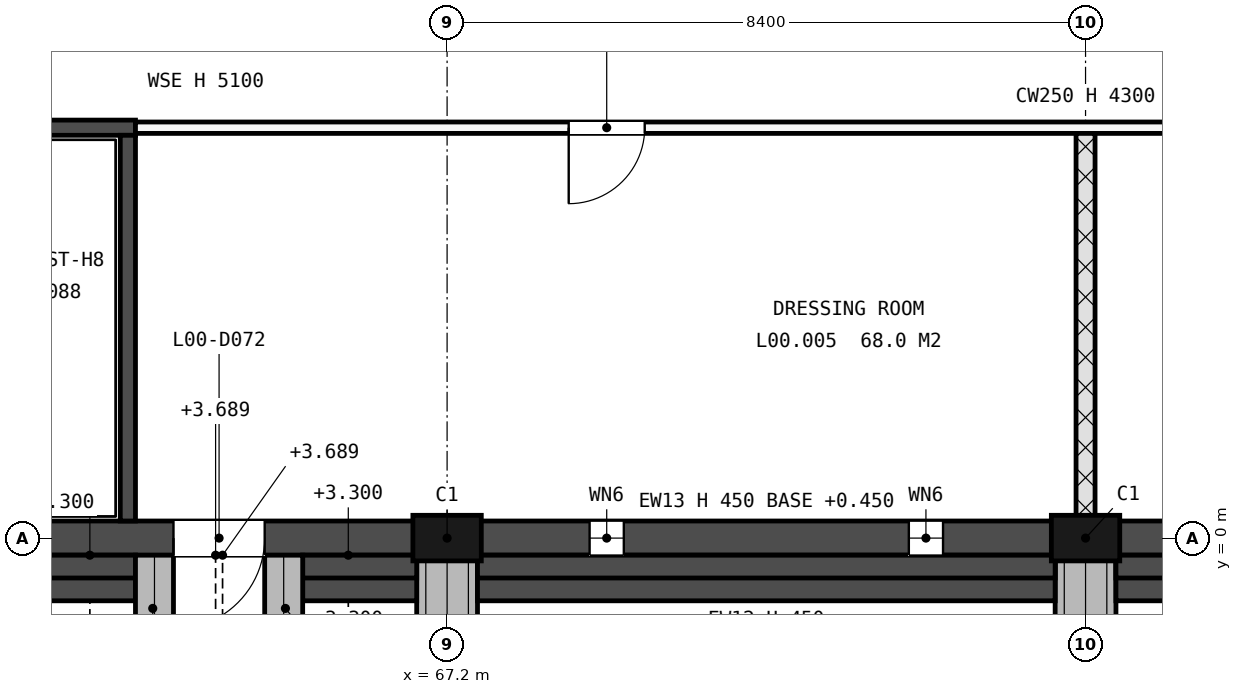
"""IFC4 building model, lengths in metres.
Left out: names, types, materials, properties, quantities, classifications, styles, units other than length and angle.
Written with IfcOpenShell. Run it as: python <this file> out.ifc"""

import sys

from ifc_helpers import new_model, si_unit, direction, frame, frame_2d, origin, origin_2d, place, context, subcontext, project, spatial, rectangle, extrude, element, fill, save


model = new_model("IFC4")
c1 = context("Model", 3, precision=1e-05, world=origin(), true_north=direction((0.0, 1.0)))
c2 = subcontext(c1, "Body", "Model", "MODEL_VIEW")
j1 = project(units=[si_unit("LENGTHUNIT", "METRE"), si_unit("PLANEANGLEUNIT", "RADIAN")], contexts=[c1])
p1 = place(None, origin())
s1 = spatial("IfcSite", under=j1, at=p1, CompositionType="ELEMENT")
p2 = place(p1, origin())
s2 = spatial("IfcBuilding", under=s1, at=p2, CompositionType="ELEMENT")
p3 = place(p2, origin())
s3 = spatial("IfcBuildingStorey", under=s2, at=p3, CompositionType="ELEMENT", Elevation=0.0)
for number, where, z_axis, x_axis in (
    (1, (67.2, 0.0, -0.3), (0.0, 0.0, 1.0), (1.0, 0.0, 0.0)),
    (2, (75.6, 0.0, -0.3), (0.0, 0.0, 1.0), (1.0, 0.0, 0.0)),
):
    element("IfcColumn", number, at=place(p3, frame(where, z_axis=z_axis, x_axis=x_axis)), inside=s3, PredefinedType="PILASTER", context=c2, shape_type="SweptSolid", body=[
        extrude(rectangle(XDim=0.9, YDim=0.6, at=origin_2d()), origin(), (0.0, 0.0, 1.0), 5.4),
    ])
p4 = place(p3, frame((0.0, 0.0, -0.3), z_axis=(0.0, 0.0, 1.0), x_axis=(1.0, 0.0, 0.0)))
e3 = element("IfcWall", 3, at=p4, inside=s3, PredefinedType="SOLIDWALL", context=c2, shape_type="SweptSolid", body=[
    extrude(rectangle(XDim=168.0, YDim=0.45, at=frame_2d((84.0, 0.0))), origin(), (0.0, 0.0, 1.0), 5.4),
])
p5 = place(p4, frame((34.8, 0.0, 2.7)))
e4 = element("IfcOpeningElement", 4, at=p5, cuts=e3, PredefinedType="OPENING", context=c2, shape_type="SweptSolid", body=[
    extrude(rectangle(XDim=1.8, YDim=1.2, at=frame_2d((0.9, 0.6))), frame((0.0, 0.235, 0.0), z_axis=(0.0, -1.0, 0.0), x_axis=(1.0, 0.0, 0.0)), (0.0, 0.0, 1.0), 0.47),
])
p6 = place(p4, frame((69.075, 0.0, 1.5)))
e5 = element("IfcOpeningElement", 5, at=p6, cuts=e3, PredefinedType="OPENING", context=c2, shape_type="SweptSolid", body=[
    extrude(rectangle(XDim=0.45, YDim=2.4, at=frame_2d((0.225, 1.2))), frame((0.0, 0.235, 0.0), z_axis=(0.0, -1.0, 0.0), x_axis=(1.0, 0.0, 0.0)), (0.0, 0.0, 1.0), 0.47),
])
p7 = place(p4, frame((73.275, 0.0, 1.5)))
e6 = element("IfcOpeningElement", 6, at=p7, cuts=e3, PredefinedType="OPENING", context=c2, shape_type="SweptSolid", body=[
    extrude(rectangle(XDim=0.45, YDim=2.4, at=frame_2d((0.225, 1.2))), frame((0.0, 0.235, 0.0), z_axis=(0.0, -1.0, 0.0), x_axis=(1.0, 0.0, 0.0)), (0.0, 0.0, 1.0), 0.47),
])
p8 = place(p4, frame((135.0, 0.0, 2.7)))
e7 = element("IfcOpeningElement", 7, at=p8, cuts=e3, PredefinedType="OPENING", context=c2, shape_type="SweptSolid", body=[
    extrude(rectangle(XDim=1.8, YDim=1.2, at=frame_2d((0.9, 0.6))), frame((0.0, 0.235, 0.0), z_axis=(0.0, -1.0, 0.0), x_axis=(1.0, 0.0, 0.0)), (0.0, 0.0, 1.0), 0.47),
])
p9 = place(p4, frame((144.0, 0.0, 2.7)))
e8 = element("IfcOpeningElement", 8, at=p9, cuts=e3, PredefinedType="OPENING", context=c2, shape_type="SweptSolid", body=[
    extrude(rectangle(XDim=1.8, YDim=1.2, at=frame_2d((0.9, 0.6))), frame((0.0, 0.235, 0.0), z_axis=(0.0, -1.0, 0.0), x_axis=(1.0, 0.0, 0.0)), (0.0, 0.0, 1.0), 0.47),
])
p10 = place(p4, frame((114.6, 0.0, 0.3), z_axis=(0.0, 0.0, 1.0), x_axis=(-1.0, 0.0, 0.0)))
e9 = element("IfcOpeningElement", 9, at=p10, cuts=e3, PredefinedType="OPENING", context=c2, shape_type="SweptSolid", body=[
    extrude(rectangle(XDim=2.1, YDim=2.2, at=frame_2d((1.05, 1.1))), frame((0.0, 0.235, 0.0), z_axis=(0.0, -1.0, 0.0), x_axis=(1.0, 0.0, 0.0)), (0.0, 0.0, 1.0), 0.47),
])
p11 = place(p4, frame((117.3, 0.0, 0.3), z_axis=(0.0, 0.0, 1.0), x_axis=(-1.0, 0.0, 0.0)))
e10 = element("IfcOpeningElement", 10, at=p11, cuts=e3, PredefinedType="OPENING", context=c2, shape_type="SweptSolid", body=[
    extrude(rectangle(XDim=2.1, YDim=2.2, at=frame_2d((1.05, 1.1))), frame((0.0, 0.235, 0.0), z_axis=(0.0, -1.0, 0.0), x_axis=(1.0, 0.0, 0.0)), (0.0, 0.0, 1.0), 0.47),
])
p12 = place(p4, frame((106.05, 0.0, 0.3), z_axis=(0.0, 0.0, 1.0), x_axis=(-1.0, 0.0, 0.0)))
e11 = element("IfcOpeningElement", 11, at=p12, cuts=e3, PredefinedType="OPENING", context=c2, shape_type="SweptSolid", body=[
    extrude(rectangle(XDim=2.1, YDim=2.2, at=frame_2d((1.05, 1.1))), frame((0.0, 0.235, 0.0), z_axis=(0.0, -1.0, 0.0), x_axis=(1.0, 0.0, 0.0)), (0.0, 0.0, 1.0), 0.47),
])
p13 = place(p4, frame((57.25, 0.0, 0.3), z_axis=(0.0, 0.0, 1.0), x_axis=(-1.0, 0.0, 0.0)))
e12 = element("IfcOpeningElement", 12, at=p13, cuts=e3, PredefinedType="OPENING", context=c2, shape_type="SweptSolid", body=[
    extrude(rectangle(XDim=2.1, YDim=2.2, at=frame_2d((1.05, 1.1))), frame((0.0, 0.235, 0.0), z_axis=(0.0, -1.0, 0.0), x_axis=(1.0, 0.0, 0.0)), (0.0, 0.0, 1.0), 0.47),
])
p14 = place(p4, frame((120.75, 0.0, 0.3), z_axis=(0.0, 0.0, 1.0), x_axis=(-1.0, 0.0, 0.0)))
e13 = element("IfcOpeningElement", 13, at=p14, cuts=e3, PredefinedType="OPENING", context=c2, shape_type="SweptSolid", body=[
    extrude(rectangle(XDim=2.1, YDim=2.2, at=frame_2d((1.05, 1.1))), frame((0.0, 0.235, 0.0), z_axis=(0.0, -1.0, 0.0), x_axis=(1.0, 0.0, 0.0)), (0.0, 0.0, 1.0), 0.47),
])
p15 = place(p4, frame((124.95, 0.0, 0.3), z_axis=(0.0, 0.0, 1.0), x_axis=(-1.0, 0.0, 0.0)))
e14 = element("IfcOpeningElement", 14, at=p15, cuts=e3, PredefinedType="OPENING", context=c2, shape_type="SweptSolid", body=[
    extrude(rectangle(XDim=2.1, YDim=2.2, at=frame_2d((1.05, 1.1))), frame((0.0, 0.235, 0.0), z_axis=(0.0, -1.0, 0.0), x_axis=(1.0, 0.0, 0.0)), (0.0, 0.0, 1.0), 0.47),
])
p16 = place(p4, frame((19.45, 0.0, 0.3), z_axis=(0.0, 0.0, 1.0), x_axis=(-1.0, 0.0, 0.0)))
e15 = element("IfcOpeningElement", 15, at=p16, cuts=e3, PredefinedType="OPENING", context=c2, shape_type="SweptSolid", body=[
    extrude(rectangle(XDim=2.1, YDim=2.2, at=frame_2d((1.05, 1.1))), frame((0.0, 0.235, 0.0), z_axis=(0.0, -1.0, 0.0), x_axis=(1.0, 0.0, 0.0)), (0.0, 0.0, 1.0), 0.47),
])
p17 = place(p4, frame((162.25, 0.0, 0.3), z_axis=(0.0, 0.0, 1.0), x_axis=(-1.0, 0.0, 0.0)))
e16 = element("IfcOpeningElement", 16, at=p17, cuts=e3, PredefinedType="OPENING", context=c2, shape_type="SweptSolid", body=[
    extrude(rectangle(XDim=2.1, YDim=2.2, at=frame_2d((1.05, 1.1))), frame((0.0, 0.235, 0.0), z_axis=(0.0, -1.0, 0.0), x_axis=(1.0, 0.0, 0.0)), (0.0, 0.0, 1.0), 0.47),
])
p18 = place(p4, frame((4.8, 0.0, 0.3), z_axis=(0.0, 0.0, 1.0), x_axis=(-1.0, 0.0, 0.0)))
e17 = element("IfcOpeningElement", 17, at=p18, cuts=e3, PredefinedType="OPENING", context=c2, shape_type="SweptSolid", body=[
    extrude(rectangle(XDim=1.2, YDim=2.2, at=frame_2d((0.6, 1.1))), frame((0.0, 0.235, 0.0), z_axis=(0.0, -1.0, 0.0), x_axis=(1.0, 0.0, 0.0)), (0.0, 0.0, 1.0), 0.47),
])
p19 = place(p4, frame((64.8, 0.0, 0.3), z_axis=(0.0, 0.0, 1.0), x_axis=(-1.0, 0.0, 0.0)))
e18 = element("IfcOpeningElement", 18, at=p19, cuts=e3, PredefinedType="OPENING", context=c2, shape_type="SweptSolid", body=[
    extrude(rectangle(XDim=1.2, YDim=2.2, at=frame_2d((0.6, 1.1))), frame((0.0, 0.235, 0.0), z_axis=(0.0, -1.0, 0.0), x_axis=(1.0, 0.0, 0.0)), (0.0, 0.0, 1.0), 0.47),
])
p20 = place(p4, frame((81.0, 0.0, 0.3), z_axis=(0.0, 0.0, 1.0), x_axis=(-1.0, 0.0, 0.0)))
e19 = element("IfcOpeningElement", 19, at=p20, cuts=e3, PredefinedType="OPENING", context=c2, shape_type="SweptSolid", body=[
    extrude(rectangle(XDim=2.4, YDim=2.4, at=frame_2d((1.2, 1.2))), frame((0.0, 0.235, 0.0), z_axis=(0.0, -1.0, 0.0), x_axis=(1.0, 0.0, 0.0)), (0.0, 0.0, 1.0), 0.47),
])
p21 = place(p4, frame((97.8, 0.0, 0.3), z_axis=(0.0, 0.0, 1.0), x_axis=(-1.0, 0.0, 0.0)))
e20 = element("IfcOpeningElement", 20, at=p21, cuts=e3, PredefinedType="OPENING", context=c2, shape_type="SweptSolid", body=[
    extrude(rectangle(XDim=2.4, YDim=2.4, at=frame_2d((1.2, 1.2))), frame((0.0, 0.235, 0.0), z_axis=(0.0, -1.0, 0.0), x_axis=(1.0, 0.0, 0.0)), (0.0, 0.0, 1.0), 0.47),
])
p22 = place(p4, frame((139.8, 0.0, 0.3), z_axis=(0.0, 0.0, 1.0), x_axis=(-1.0, 0.0, 0.0)))
e21 = element("IfcOpeningElement", 21, at=p22, cuts=e3, PredefinedType="OPENING", context=c2, shape_type="SweptSolid", body=[
    extrude(rectangle(XDim=2.4, YDim=2.1, at=frame_2d((1.2, 1.05))), frame((0.0, 0.235, 0.0), z_axis=(0.0, -1.0, 0.0), x_axis=(1.0, 0.0, 0.0)), (0.0, 0.0, 1.0), 0.47),
])
p23 = place(p4, frame((156.3, 0.0, 0.3), z_axis=(0.0, 0.0, 1.0), x_axis=(-1.0, 0.0, 0.0)))
e22 = element("IfcOpeningElement", 22, at=p23, cuts=e3, PredefinedType="OPENING", context=c2, shape_type="SweptSolid", body=[
    extrude(rectangle(XDim=1.8, YDim=2.2, at=frame_2d((0.9, 1.1))), frame((0.0, 0.235, 0.0), z_axis=(0.0, -1.0, 0.0), x_axis=(1.0, 0.0, 0.0)), (0.0, 0.0, 1.0), 0.47),
])
for number, where, z_axis, x_axis in (
    (23, (67.2, -0.225, 0.0), (0.0, 0.0, 1.0), (0.0, -1.0, 0.0)),
    (24, (75.6, -0.225, 0.0), (0.0, 0.0, 1.0), (0.0, -1.0, 0.0)),
):
    element("IfcWall", number, at=place(p3, frame(where, z_axis=z_axis, x_axis=x_axis)), inside=s3, PredefinedType="SOLIDWALL", context=c2, shape_type="SweptSolid", body=[
        extrude(rectangle(XDim=0.9, YDim=0.8, at=frame_2d((0.45, 0.0))), origin(), (0.0, 0.0, 1.0), 5.1),
    ])
p24 = place(p3, frame((59.2, -0.525, 0.0), z_axis=(0.0, 0.0, 1.0), x_axis=(1.0, 0.0, 0.0)))
e25 = element("IfcWall", 25, at=p24, inside=s3, PredefinedType="SOLIDWALL", context=c2, shape_type="SweptSolid", body=[
    extrude(rectangle(XDim=3.9, YDim=0.6, at=frame_2d((1.95, 0.0))), origin(), (0.0, 0.0, 1.0), 0.45),
])
p25 = place(p3, frame((59.2, -0.375, 0.45), z_axis=(0.0, 0.0, 1.0), x_axis=(1.0, 0.0, 0.0)))
e26 = element("IfcWall", 26, at=p25, inside=s3, PredefinedType="SOLIDWALL", context=c2, shape_type="SweptSolid", body=[
    extrude(rectangle(XDim=3.9, YDim=0.3, at=frame_2d((1.95, 0.0))), origin(), (0.0, 0.0, 1.0), 0.45),
])
p26 = place(p3, frame((65.3, -0.525, 0.0), z_axis=(0.0, 0.0, 1.0), x_axis=(1.0, 0.0, 0.0)))
e27 = element("IfcWall", 27, at=p26, inside=s3, PredefinedType="SOLIDWALL", context=c2, shape_type="SweptSolid", body=[
    extrude(rectangle(XDim=1.5, YDim=0.6, at=frame_2d((0.75, 0.0))), origin(), (0.0, 0.0, 1.0), 0.45),
])
p27 = place(p3, frame((65.3, -0.375, 0.45), z_axis=(0.0, 0.0, 1.0), x_axis=(1.0, 0.0, 0.0)))
e28 = element("IfcWall", 28, at=p27, inside=s3, PredefinedType="SOLIDWALL", context=c2, shape_type="SweptSolid", body=[
    extrude(rectangle(XDim=1.5, YDim=0.3, at=frame_2d((0.75, 0.0))), origin(), (0.0, 0.0, 1.0), 0.45),
])
p28 = place(p3, frame((67.6, -0.525, 0.0), z_axis=(0.0, 0.0, 1.0), x_axis=(1.0, 0.0, 0.0)))
e29 = element("IfcWall", 29, at=p28, inside=s3, PredefinedType="SOLIDWALL", context=c2, shape_type="SweptSolid", body=[
    extrude(rectangle(XDim=7.6, YDim=0.6, at=frame_2d((3.8, 0.0))), origin(), (0.0, 0.0, 1.0), 0.45),
])
p29 = place(p3, frame((67.6, -0.375, 0.45), z_axis=(0.0, 0.0, 1.0), x_axis=(1.0, 0.0, 0.0)))
e30 = element("IfcWall", 30, at=p29, inside=s3, PredefinedType="SOLIDWALL", context=c2, shape_type="SweptSolid", body=[
    extrude(rectangle(XDim=7.6, YDim=0.3, at=frame_2d((3.8, 0.0))), origin(), (0.0, 0.0, 1.0), 0.45),
])
p30 = place(p3, frame((76.0, -0.525, 0.0), z_axis=(0.0, 0.0, 1.0), x_axis=(1.0, 0.0, 0.0)))
e31 = element("IfcWall", 31, at=p30, inside=s3, PredefinedType="SOLIDWALL", context=c2, shape_type="SweptSolid", body=[
    extrude(rectangle(XDim=2.1, YDim=0.6, at=frame_2d((1.05, 0.0))), origin(), (0.0, 0.0, 1.0), 0.45),
])
p31 = place(p3, frame((76.0, -0.375, 0.45), z_axis=(0.0, 0.0, 1.0), x_axis=(1.0, 0.0, 0.0)))
e32 = element("IfcWall", 32, at=p31, inside=s3, PredefinedType="SOLIDWALL", context=c2, shape_type="SweptSolid", body=[
    extrude(rectangle(XDim=2.1, YDim=0.3, at=frame_2d((1.05, 0.0))), origin(), (0.0, 0.0, 1.0), 0.45),
])
for number, where, z_axis, x_axis in (
    (33, (63.35, -0.225, 0.0), (0.0, 0.0, 1.0), (0.0, -1.0, 0.0)),
    (34, (65.05, -0.225, 0.0), (0.0, 0.0, 1.0), (0.0, -1.0, 0.0)),
):
    element("IfcWall", number, at=place(p3, frame(where, z_axis=z_axis, x_axis=x_axis)), inside=s3, PredefinedType="SOLIDWALL", context=c2, shape_type="SweptSolid", body=[
        extrude(rectangle(XDim=1.4, YDim=0.5, at=frame_2d((0.7, 0.0))), origin(), (0.0, 0.0, 1.0), 3.08),
    ])
p32 = place(p3, frame((54.5, 5.4, 0.0), z_axis=(0.0, 0.0, 1.0), x_axis=(1.0, 0.0, 0.0)))
e35 = element("IfcWall", 35, at=p32, inside=s3, PredefinedType="SHEAR", context=c2, shape_type="SweptSolid", body=[
    extrude(rectangle(XDim=8.6, YDim=0.2, at=frame_2d((4.3, 0.0))), origin(), (0.0, 0.0, 1.0), 5.1),
])
p33 = place(p32, frame((0.35, 0.0, 0.0)))
e36 = element("IfcOpeningElement", 36, at=p33, cuts=e35, PredefinedType="OPENING", context=c2, shape_type="SweptSolid", body=[
    extrude(rectangle(XDim=1.0, YDim=2.1, at=frame_2d((0.5, 1.05))), frame((0.0, 0.11, 0.0), z_axis=(0.0, -1.0, 0.0), x_axis=(1.0, 0.0, 0.0)), (0.0, 0.0, 1.0), 0.22),
])
p34 = place(p3, frame((63.0, 0.225, 0.0), z_axis=(0.0, 0.0, 1.0), x_axis=(0.0, 1.0, 0.0)))
e37 = element("IfcWall", 37, at=p34, inside=s3, PredefinedType="SHEAR", context=c2, shape_type="SweptSolid", body=[
    extrude(rectangle(XDim=5.075, YDim=0.2, at=frame_2d((2.538, 0.0))), origin(), (0.0, 0.0, 1.0), 5.1),
])
p35 = place(p3, frame((63.1, 5.4, 0.0), z_axis=(0.0, 0.0, 1.0), x_axis=(1.0, 0.0, 0.0)))
e38 = element("IfcWall", 38, at=p35, inside=s3, PredefinedType="PARTITIONING", context=c2, shape_type="SweptSolid", body=[
    extrude(rectangle(XDim=29.425, YDim=0.15, at=frame_2d((14.712, 0.0))), origin(), (0.0, 0.0, 1.0), 5.1),
])
p36 = place(p35, frame((5.7, 0.0, 0.0)))
e39 = element("IfcOpeningElement", 39, at=p36, cuts=e38, PredefinedType="OPENING", context=c2, shape_type="SweptSolid", body=[
    extrude(rectangle(XDim=1.0, YDim=2.1, at=frame_2d((0.5, 1.05))), frame((0.0, 0.085, 0.0), z_axis=(0.0, -1.0, 0.0), x_axis=(1.0, 0.0, 0.0)), (0.0, 0.0, 1.0), 0.17),
])
p37 = place(p35, frame((20.4, 0.0, 0.0)))
e40 = element("IfcOpeningElement", 40, at=p37, cuts=e38, PredefinedType="OPENING", context=c2, shape_type="SweptSolid", body=[
    extrude(rectangle(XDim=1.0, YDim=2.1, at=frame_2d((0.5, 1.05))), frame((0.0, 0.085, 0.0), z_axis=(0.0, -1.0, 0.0), x_axis=(1.0, 0.0, 0.0)), (0.0, 0.0, 1.0), 0.17),
])
p38 = place(p3, frame((75.6, 0.225, 0.0), z_axis=(0.0, 0.0, 1.0), x_axis=(0.0, 1.0, 0.0)))
e41 = element("IfcWall", 41, at=p38, inside=s3, PredefinedType="SOLIDWALL", context=c2, shape_type="SweptSolid", body=[
    extrude(rectangle(XDim=5.1, YDim=0.25, at=frame_2d((2.55, 0.0))), origin(), (0.0, 0.0, 1.0), 4.3),
])
p39 = place(p6, origin())
e42 = element("IfcWindow", 42, at=p39, inside=s3, PartitioningType="SINGLE_PANEL", PredefinedType="WINDOW", context=c2, shape_type="SweptSolid", body=[
    extrude(rectangle(XDim=0.45, YDim=2.4, at=frame_2d((0.225, 1.2))), frame((0.0, 0.03, 0.0), z_axis=(0.0, -1.0, 0.0), x_axis=(1.0, 0.0, 0.0)), (0.0, 0.0, 1.0), 0.06),
])
fill(e5, e42)
p40 = place(p7, origin())
e43 = element("IfcWindow", 43, at=p40, inside=s3, PartitioningType="SINGLE_PANEL", PredefinedType="WINDOW", context=c2, shape_type="SweptSolid", body=[
    extrude(rectangle(XDim=0.45, YDim=2.4, at=frame_2d((0.225, 1.2))), frame((0.0, 0.03, 0.0), z_axis=(0.0, -1.0, 0.0), x_axis=(1.0, 0.0, 0.0)), (0.0, 0.0, 1.0), 0.06),
])
fill(e6, e43)
p41 = place(p19, origin())
e44 = element("IfcDoor", 44, at=p41, inside=s3, OperationType="SINGLE_SWING_LEFT", PredefinedType="DOOR", context=c2, shape_type="SweptSolid", body=[
    extrude(rectangle(XDim=1.2, YDim=0.013, at=frame_2d((0.6, 0.007))), frame((0.0, 0.115, 0.0), z_axis=(0.0, -1.0, 0.0), x_axis=(1.0, 0.0, 0.0)), (0.0, 0.0, 1.0), 0.23),
    extrude(rectangle(XDim=0.06, YDim=2.127, at=frame_2d((0.03, 1.076))), frame((0.0, 0.125, 0.0), z_axis=(0.0, -1.0, 0.0), x_axis=(1.0, 0.0, 0.0)), (0.0, 0.0, 1.0), 0.25),
    extrude(rectangle(XDim=0.06, YDim=2.127, at=frame_2d((1.17, 1.076))), frame((0.0, 0.125, 0.0), z_axis=(0.0, -1.0, 0.0), x_axis=(1.0, 0.0, 0.0)), (0.0, 0.0, 1.0), 0.25),
    extrude(rectangle(XDim=1.2, YDim=0.06, at=frame_2d((0.6, 2.17))), frame((0.0, 0.115, 0.0), z_axis=(0.0, -1.0, 0.0), x_axis=(1.0, 0.0, 0.0)), (0.0, 0.0, 1.0), 0.23),
    extrude(rectangle(XDim=1.08, YDim=2.127, at=frame_2d((0.6, 1.076))), frame((0.0, 0.025, 0.0), z_axis=(0.0, -1.0, 0.0), x_axis=(1.0, 0.0, 0.0)), (0.0, 0.0, 1.0), 0.05),
])
fill(e18, e44)
p42 = place(p36, origin())
e45 = element("IfcDoor", 45, at=p42, inside=s3, OperationType="SINGLE_SWING_LEFT", PredefinedType="DOOR", context=c2, shape_type="SweptSolid", body=[
    extrude(rectangle(XDim=1.0, YDim=2.1, at=frame_2d((0.5, 1.05))), frame((0.0, 0.025, 0.0), z_axis=(0.0, -1.0, 0.0), x_axis=(1.0, 0.0, 0.0)), (0.0, 0.0, 1.0), 0.05),
])
fill(e39, e45)
save(model, sys.argv[1])
